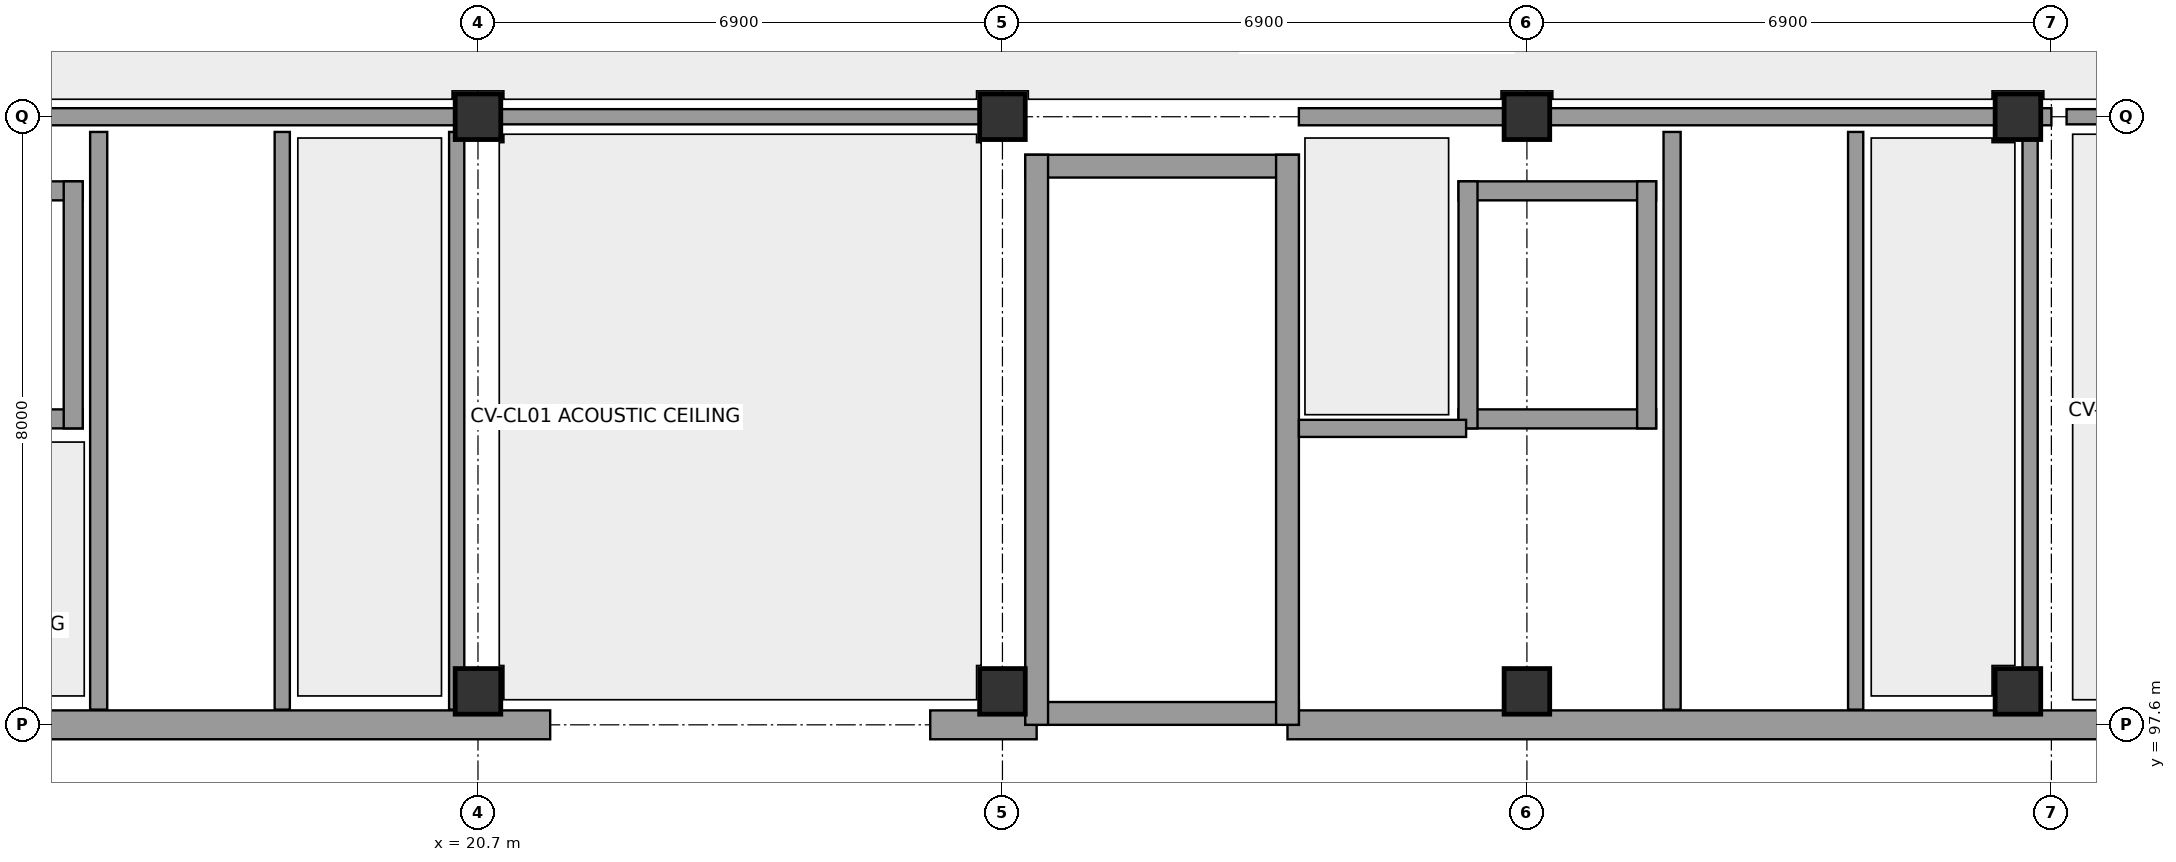
"""IFC4 building model, lengths in metres.
Left out: names, types, materials, properties, quantities, classifications, styles, units other than length and angle.
Written with IfcOpenShell. Run it as: python <this file> out.ifc"""

import sys

from ifc_helpers import new_model, si_unit, direction, frame, frame_2d, origin, origin_with_axes, origin_2d, place, context, subcontext, project, spatial, rectangle, extrude, element, fill, save


model = new_model("IFC4")
c1 = context("Model", 3, precision=1e-05, world=origin(), true_north=direction((0.0, 1.0)))
c2 = subcontext(c1, "Body", "Model", "MODEL_VIEW")
j1 = project(units=[si_unit("LENGTHUNIT", "METRE"), si_unit("PLANEANGLEUNIT", "RADIAN")], contexts=[c1])
p1 = place(None, origin())
s1 = spatial("IfcSite", under=j1, at=p1, CompositionType="ELEMENT")
p2 = place(p1, origin())
s2 = spatial("IfcBuilding", under=s1, at=p2, CompositionType="ELEMENT")
p3 = place(p2, origin())
s3 = spatial("IfcBuildingStorey", under=s2, at=p3, CompositionType="ELEMENT", Elevation=0.0)
for number, where, z_axis, x_axis in (
    (1, (20.7, 98.04, 0.0), (0.0, 0.0, 1.0), (1.0, 0.0, 0.0)),
    (2, (20.7, 105.6, 0.0), (0.0, 0.0, 1.0), (1.0, 0.0, 0.0)),
    (3, (27.6, 98.04, 0.0), (0.0, 0.0, 1.0), (1.0, 0.0, 0.0)),
    (4, (27.6, 105.6, 0.0), (0.0, 0.0, 1.0), (1.0, 0.0, 0.0)),
    (5, (34.5, 98.04, 0.0), (0.0, 0.0, 1.0), (1.0, 0.0, 0.0)),
    (6, (34.5, 105.6, 0.0), (0.0, 0.0, 1.0), (1.0, 0.0, 0.0)),
    (7, (40.96, 98.04, 0.0), (0.0, 0.0, 1.0), (1.0, 0.0, 0.0)),
    (8, (40.96, 105.6, 0.0), (0.0, 0.0, 1.0), (1.0, 0.0, 0.0)),
):
    element("IfcColumn", number, at=place(p3, frame(where, z_axis=z_axis, x_axis=x_axis)), inside=s3, PredefinedType="COLUMN", context=c2, shape_type="SweptSolid", body=[
        extrude(rectangle(XDim=0.6, YDim=0.6, at=origin_2d()), origin(), (0.0, 0.0, 1.0), 4.4),
    ])
p4 = place(p3, frame((10.65, 97.6, 0.0), z_axis=(0.0, 0.0, 1.0), x_axis=(1.0, 0.0, 0.0)))
e9 = element("IfcWall", 9, at=p4, inside=s3, PredefinedType="STANDARD", context=c2, shape_type="SweptSolid", body=[
    extrude(rectangle(XDim=11.0, YDim=0.38, at=frame_2d((5.5, 0.0))), origin(), (0.0, 0.0, 1.0), 4.12),
])
p5 = place(p3, frame((26.65, 97.6, 0.0), z_axis=(0.0, 0.0, 1.0), x_axis=(1.0, 0.0, 0.0)))
e10 = element("IfcWall", 10, at=p5, inside=s3, PredefinedType="STANDARD", context=c2, shape_type="SweptSolid", body=[
    extrude(rectangle(XDim=1.4, YDim=0.38, at=frame_2d((0.7, 0.0))), origin(), (0.0, 0.0, 1.0), 4.12),
])
p6 = place(p3, frame((31.35, 97.6, 0.0), z_axis=(0.0, 0.0, 1.0), x_axis=(1.0, 0.0, 0.0)))
e11 = element("IfcWall", 11, at=p6, inside=s3, PredefinedType="STANDARD", context=c2, shape_type="SweptSolid", body=[
    extrude(rectangle(XDim=11.0, YDim=0.38, at=frame_2d((5.5, 0.0))), origin(), (0.0, 0.0, 1.0), 4.12),
])
p7 = place(p3, frame((12.9, 101.625, 0.0), z_axis=(0.0, 0.0, 1.0), x_axis=(1.0, 0.0, 0.0)))
e12 = element("IfcWall", 12, at=p7, inside=s3, PredefinedType="SHEAR", context=c2, shape_type="SweptSolid", body=[
    extrude(rectangle(XDim=2.6, YDim=0.25, at=frame_2d((1.3, 0.0))), origin(), (0.0, 0.0, 1.0), 4.12),
])
p8 = place(p7, frame((0.875, 0.0, 0.0)))
e13 = element("IfcOpeningElement", 13, at=p8, cuts=e12, PredefinedType="OPENING", context=c2, shape_type="SweptSolid", body=[
    extrude(rectangle(XDim=1.1, YDim=2.1, at=frame_2d((0.55, 1.05))), frame((0.0, 0.137, 0.0), z_axis=(0.0, -1.0, 0.0), x_axis=(1.0, 0.0, 0.0)), (0.0, 0.0, 1.0), 0.274),
])
p9 = place(p3, frame((12.9, 104.625, 0.0), z_axis=(0.0, 0.0, 1.0), x_axis=(1.0, 0.0, 0.0)))
e14 = element("IfcWall", 14, at=p9, inside=s3, PredefinedType="SHEAR", context=c2, shape_type="SweptSolid", body=[
    extrude(rectangle(XDim=2.6, YDim=0.25, at=frame_2d((1.3, 0.0))), origin(), (0.0, 0.0, 1.0), 4.12),
])
p10 = place(p3, frame((15.375, 101.5, 0.0), z_axis=(0.0, 0.0, 1.0), x_axis=(0.0, 1.0, 0.0)))
e15 = element("IfcWall", 15, at=p10, inside=s3, PredefinedType="SHEAR", context=c2, shape_type="SweptSolid", body=[
    extrude(rectangle(XDim=3.25, YDim=0.25, at=frame_2d((1.625, 0.0))), origin(), (0.0, 0.0, 1.0), 4.12),
])
p11 = place(p3, frame((15.71, 97.8, 0.0), z_axis=(0.0, 0.0, 1.0), x_axis=(0.0, 1.0, 0.0)))
e16 = element("IfcWall", 16, at=p11, inside=s3, PredefinedType="PARTITIONING", context=c2, shape_type="SweptSolid", body=[
    extrude(rectangle(XDim=7.6, YDim=0.225, at=frame_2d((3.8, 0.0))), origin(), (0.0, 0.0, 1.0), 3.79),
])
p12 = place(p3, frame((18.125, 97.8, 0.0), z_axis=(0.0, 0.0, 1.0), x_axis=(0.0, 1.0, 0.0)))
e17 = element("IfcWall", 17, at=p12, inside=s3, PredefinedType="PARTITIONING", context=c2, shape_type="SweptSolid", body=[
    extrude(rectangle(XDim=7.6, YDim=0.2, at=frame_2d((3.8, 0.0))), origin(), (0.0, 0.0, 1.0), 3.79),
])
p13 = place(p3, frame((20.42, 97.8, 0.0), z_axis=(0.0, 0.0, 1.0), x_axis=(0.0, 1.0, 0.0)))
e18 = element("IfcWall", 18, at=p13, inside=s3, PredefinedType="PARTITIONING", context=c2, shape_type="SweptSolid", body=[
    extrude(rectangle(XDim=7.6, YDim=0.2, at=frame_2d((3.8, 0.0))), origin(), (0.0, 0.0, 1.0), 4.12),
])
p14 = place(p3, frame((10.8, 105.6, 0.0), z_axis=(0.0, 0.0, 1.0), x_axis=(1.0, 0.0, 0.0)))
e19 = element("IfcWall", 19, at=p14, inside=s3, PredefinedType="PARTITIONING", context=c2, shape_type="SweptSolid", body=[
    extrude(rectangle(XDim=9.9, YDim=0.225, at=frame_2d((4.95, 0.0))), origin(), (0.0, 0.0, 1.0), 3.56),
])
p15 = place(p14, frame((0.475, 0.0, 0.0)))
e20 = element("IfcOpeningElement", 20, at=p15, cuts=e19, PredefinedType="OPENING", context=c2, shape_type="SweptSolid", body=[
    extrude(rectangle(XDim=1.1, YDim=2.15, at=frame_2d((0.55, 1.075))), frame((0.0, 0.125, 0.0), z_axis=(0.0, -1.0, 0.0), x_axis=(1.0, 0.0, 0.0)), (0.0, 0.0, 1.0), 0.249),
])
p16 = place(p14, frame((5.75, 0.0, 0.0)))
e21 = element("IfcOpeningElement", 21, at=p16, cuts=e19, PredefinedType="OPENING", context=c2, shape_type="SweptSolid", body=[
    extrude(rectangle(XDim=0.9, YDim=2.1, at=frame_2d((0.45, 1.05))), frame((0.0, 0.125, 0.0), z_axis=(0.0, -1.0, 0.0), x_axis=(1.0, 0.0, 0.0)), (0.0, 0.0, 1.0), 0.249),
])
p17 = place(p14, frame((7.8, 0.0, 0.0)))
e22 = element("IfcOpeningElement", 22, at=p17, cuts=e19, PredefinedType="OPENING", context=c2, shape_type="SweptSolid", body=[
    extrude(rectangle(XDim=0.95, YDim=2.15, at=frame_2d((0.475, 1.075))), frame((0.0, 0.125, 0.0), z_axis=(0.0, -1.0, 0.0), x_axis=(1.0, 0.0, 0.0)), (0.0, 0.0, 1.0), 0.249),
])
p18 = place(p3, frame((27.9, 97.75, 0.0), z_axis=(0.0, 0.0, 1.0), x_axis=(1.0, 0.0, 0.0)))
e23 = element("IfcWall", 23, at=p18, inside=s3, PredefinedType="SHEAR", context=c2, shape_type="SweptSolid", body=[
    extrude(rectangle(XDim=3.6, YDim=0.3, at=frame_2d((1.8, 0.0))), origin(), (0.0, 0.0, 1.0), 4.12),
])
p19 = place(p18, frame((1.1, 0.0, 0.0)))
e24 = element("IfcOpeningElement", 24, at=p19, cuts=e23, PredefinedType="OPENING", context=c2, shape_type="SweptSolid", body=[
    extrude(rectangle(XDim=1.4, YDim=2.25, at=frame_2d((0.7, 1.125))), frame((0.0, 0.162, 0.0), z_axis=(0.0, -1.0, 0.0), x_axis=(1.0, 0.0, 0.0)), (0.0, 0.0, 1.0), 0.324),
])
p20 = place(p3, frame((27.9, 104.95, 0.0), z_axis=(0.0, 0.0, 1.0), x_axis=(1.0, 0.0, 0.0)))
e25 = element("IfcWall", 25, at=p20, inside=s3, PredefinedType="SHEAR", context=c2, shape_type="SweptSolid", body=[
    extrude(rectangle(XDim=3.6, YDim=0.3, at=frame_2d((1.8, 0.0))), origin(), (0.0, 0.0, 1.0), 4.12),
])
p21 = place(p3, frame((28.05, 97.6, 0.0), z_axis=(0.0, 0.0, 1.0), x_axis=(0.0, 1.0, 0.0)))
e26 = element("IfcWall", 26, at=p21, inside=s3, PredefinedType="SHEAR", context=c2, shape_type="SweptSolid", body=[
    extrude(rectangle(XDim=7.5, YDim=0.3, at=frame_2d((3.75, 0.0))), origin(), (0.0, 0.0, 1.0), 4.12),
])
p22 = place(p3, frame((31.35, 97.6, 0.0), z_axis=(0.0, 0.0, 1.0), x_axis=(0.0, 1.0, 0.0)))
e27 = element("IfcWall", 27, at=p22, inside=s3, PredefinedType="SHEAR", context=c2, shape_type="SweptSolid", body=[
    extrude(rectangle(XDim=7.5, YDim=0.3, at=frame_2d((3.75, 0.0))), origin(), (0.0, 0.0, 1.0), 4.12),
])
p23 = place(p22, frame((0.65, 0.0, 0.0)))
e28 = element("IfcOpeningElement", 28, at=p23, cuts=e27, PredefinedType="OPENING", context=c2, shape_type="SweptSolid", body=[
    extrude(rectangle(XDim=1.15, YDim=2.15, at=frame_2d((0.575, 1.075))), frame((0.0, 0.162, 0.0), z_axis=(0.0, -1.0, 0.0), x_axis=(1.0, 0.0, 0.0)), (0.0, 0.0, 1.0), 0.324),
])
p24 = place(p3, frame((33.6, 101.625, 0.0), z_axis=(0.0, 0.0, 1.0), x_axis=(1.0, 0.0, 0.0)))
e29 = element("IfcWall", 29, at=p24, inside=s3, PredefinedType="SHEAR", context=c2, shape_type="SweptSolid", body=[
    extrude(rectangle(XDim=2.6, YDim=0.25, at=frame_2d((1.3, 0.0))), origin(), (0.0, 0.0, 1.0), 4.12),
])
p25 = place(p24, frame((0.925, 0.0, 0.0)))
e30 = element("IfcOpeningElement", 30, at=p25, cuts=e29, PredefinedType="OPENING", context=c2, shape_type="SweptSolid", body=[
    extrude(rectangle(XDim=1.0, YDim=2.1, at=frame_2d((0.5, 1.05))), frame((0.0, 0.137, 0.0), z_axis=(0.0, -1.0, 0.0), x_axis=(1.0, 0.0, 0.0)), (0.0, 0.0, 1.0), 0.274),
])
p26 = place(p3, frame((33.6, 104.625, 0.0), z_axis=(0.0, 0.0, 1.0), x_axis=(1.0, 0.0, 0.0)))
e31 = element("IfcWall", 31, at=p26, inside=s3, PredefinedType="SHEAR", context=c2, shape_type="SweptSolid", body=[
    extrude(rectangle(XDim=2.6, YDim=0.25, at=frame_2d((1.3, 0.0))), origin(), (0.0, 0.0, 1.0), 4.12),
])
for number, where, z_axis, x_axis in (
    (32, (33.725, 101.5, 0.0), (0.0, 0.0, 1.0), (0.0, 1.0, 0.0)),
    (33, (36.075, 101.5, 0.0), (0.0, 0.0, 1.0), (0.0, 1.0, 0.0)),
):
    element("IfcWall", number, at=place(p3, frame(where, z_axis=z_axis, x_axis=x_axis)), inside=s3, PredefinedType="SHEAR", context=c2, shape_type="SweptSolid", body=[
        extrude(rectangle(XDim=3.25, YDim=0.25, at=frame_2d((1.625, 0.0))), origin(), (0.0, 0.0, 1.0), 4.12),
    ])
p27 = place(p3, frame((36.41, 97.8, 0.0), z_axis=(0.0, 0.0, 1.0), x_axis=(0.0, 1.0, 0.0)))
e34 = element("IfcWall", 34, at=p27, inside=s3, PredefinedType="PARTITIONING", context=c2, shape_type="SweptSolid", body=[
    extrude(rectangle(XDim=7.6, YDim=0.225, at=frame_2d((3.8, 0.0))), origin(), (0.0, 0.0, 1.0), 4.12),
])
p28 = place(p3, frame((31.5, 101.5, 0.0), z_axis=(0.0, 0.0, 1.0), x_axis=(1.0, 0.0, 0.0)))
e35 = element("IfcWall", 35, at=p28, inside=s3, PredefinedType="PARTITIONING", context=c2, shape_type="SweptSolid", body=[
    extrude(rectangle(XDim=2.2, YDim=0.225, at=frame_2d((1.1, 0.0))), origin(), (0.0, 0.0, 1.0), 4.12),
])
p29 = place(p28, frame((0.45, 0.0, 0.0)))
e36 = element("IfcOpeningElement", 36, at=p29, cuts=e35, PredefinedType="OPENING", context=c2, shape_type="SweptSolid", body=[
    extrude(rectangle(XDim=1.1, YDim=2.15, at=frame_2d((0.55, 1.075))), frame((0.0, 0.125, 0.0), z_axis=(0.0, -1.0, 0.0), x_axis=(1.0, 0.0, 0.0)), (0.0, 0.0, 1.0), 0.249),
])
p30 = place(p3, frame((27.6, 105.6, 0.0), z_axis=(0.0, 0.0, 1.0), x_axis=(1.0, 0.0, 0.0)))
e37 = element("IfcWall", 37, at=p30, inside=s3, PredefinedType="PARTITIONING", context=c2, shape_type="SweptSolid", body=[
    extrude(rectangle(XDim=0.3, YDim=0.225, at=frame_2d((0.15, 0.0))), origin(), (0.0, 0.0, 1.0), 4.12),
])
for number, where, z_axis, x_axis in (
    (38, (38.825, 97.8, 0.0), (0.0, 0.0, 1.0), (0.0, 1.0, 0.0)),
    (39, (41.12, 97.8, 0.0), (0.0, 0.0, 1.0), (0.0, 1.0, 0.0)),
):
    element("IfcWall", number, at=place(p3, frame(where, z_axis=z_axis, x_axis=x_axis)), inside=s3, PredefinedType="PARTITIONING", context=c2, shape_type="SweptSolid", body=[
        extrude(rectangle(XDim=7.6, YDim=0.2, at=frame_2d((3.8, 0.0))), origin(), (0.0, 0.0, 1.0), 4.12),
    ])
p31 = place(p3, frame((31.5, 105.6, 0.0), z_axis=(0.0, 0.0, 1.0), x_axis=(1.0, 0.0, 0.0)))
e40 = element("IfcWall", 40, at=p31, inside=s3, PredefinedType="PARTITIONING", context=c2, shape_type="SweptSolid", body=[
    extrude(rectangle(XDim=9.9, YDim=0.225, at=frame_2d((4.95, 0.0))), origin(), (0.0, 0.0, 1.0), 3.56),
])
p32 = place(p31, frame((0.475, 0.0, 0.0)))
e41 = element("IfcOpeningElement", 41, at=p32, cuts=e40, PredefinedType="OPENING", context=c2, shape_type="SweptSolid", body=[
    extrude(rectangle(XDim=1.1, YDim=2.15, at=frame_2d((0.55, 1.075))), frame((0.0, 0.125, 0.0), z_axis=(0.0, -1.0, 0.0), x_axis=(1.0, 0.0, 0.0)), (0.0, 0.0, 1.0), 0.249),
])
p33 = place(p31, frame((5.75, 0.0, 0.0)))
e42 = element("IfcOpeningElement", 42, at=p33, cuts=e40, PredefinedType="OPENING", context=c2, shape_type="SweptSolid", body=[
    extrude(rectangle(XDim=0.9, YDim=2.1, at=frame_2d((0.45, 1.05))), frame((0.0, 0.125, 0.0), z_axis=(0.0, -1.0, 0.0), x_axis=(1.0, 0.0, 0.0)), (0.0, 0.0, 1.0), 0.249),
])
p34 = place(p31, frame((7.8, 0.0, 0.0)))
e43 = element("IfcOpeningElement", 43, at=p34, cuts=e40, PredefinedType="OPENING", context=c2, shape_type="SweptSolid", body=[
    extrude(rectangle(XDim=0.95, YDim=2.15, at=frame_2d((0.475, 1.075))), frame((0.0, 0.125, 0.0), z_axis=(0.0, -1.0, 0.0), x_axis=(1.0, 0.0, 0.0)), (0.0, 0.0, 1.0), 0.249),
])
p35 = place(p3, frame((20.9, 105.6, 0.0), z_axis=(0.0, 0.0, 1.0), x_axis=(1.0, 0.0, 0.0)))
e44 = element("IfcWall", 44, at=p35, inside=s3, PredefinedType="PARTITIONING", context=c2, shape_type="SweptSolid", body=[
    extrude(rectangle(XDim=6.5, YDim=0.2, at=frame_2d((3.25, 0.0))), origin(), (0.0, 0.0, 1.0), 3.56),
])
p36 = place(p35, frame((1.9, 0.0, 0.0)))
e45 = element("IfcOpeningElement", 45, at=p36, cuts=e44, PredefinedType="OPENING", context=c2, shape_type="SweptSolid", body=[
    extrude(rectangle(XDim=0.95, YDim=2.15, at=frame_2d((0.475, 1.075))), frame((0.0, 0.112, 0.0), z_axis=(0.0, -1.0, 0.0), x_axis=(1.0, 0.0, 0.0)), (0.0, 0.0, 1.0), 0.224),
])
p37 = place(p3, frame((41.6, 105.6, 0.0), z_axis=(0.0, 0.0, 1.0), x_axis=(1.0, 0.0, 0.0)))
e46 = element("IfcWall", 46, at=p37, inside=s3, PredefinedType="PARTITIONING", context=c2, shape_type="SweptSolid", body=[
    extrude(rectangle(XDim=13.35, YDim=0.2, at=frame_2d((6.675, 0.0))), origin(), (0.0, 0.0, 1.0), 3.56),
])
p38 = place(p37, frame((1.9, 0.0, 0.0)))
e47 = element("IfcOpeningElement", 47, at=p38, cuts=e46, PredefinedType="OPENING", context=c2, shape_type="SweptSolid", body=[
    extrude(rectangle(XDim=0.95, YDim=2.15, at=frame_2d((0.475, 1.075))), frame((0.0, 0.112, 0.0), z_axis=(0.0, -1.0, 0.0), x_axis=(1.0, 0.0, 0.0)), (0.0, 0.0, 1.0), 0.224),
])
p39 = place(p16, origin_with_axes())
e48 = element("IfcDoor", 48, at=p39, inside=s3, OperationType="SINGLE_SWING_LEFT", PredefinedType="DOOR", context=c2, shape_type="SweptSolid", body=[
    extrude(rectangle(XDim=0.9, YDim=2.1, at=frame_2d((0.45, 1.05))), frame((0.0, 0.025, 0.0), z_axis=(0.0, -1.0, 0.0), x_axis=(1.0, 0.0, 0.0)), (0.0, 0.0, 1.0), 0.05),
])
fill(e21, e48)
p40 = place(p17, origin_with_axes())
e49 = element("IfcDoor", 49, at=p40, inside=s3, OperationType="SINGLE_SWING_RIGHT", PredefinedType="DOOR", context=c2, shape_type="SweptSolid", body=[
    extrude(rectangle(XDim=0.95, YDim=2.15, at=frame_2d((0.475, 1.075))), frame((0.0, 0.025, 0.0), z_axis=(0.0, -1.0, 0.0), x_axis=(1.0, 0.0, 0.0)), (0.0, 0.0, 1.0), 0.05),
])
fill(e22, e49)
p41 = place(p19, frame((1.4, 0.0, 0.0), z_axis=(0.0, 0.0, 1.0), x_axis=(-1.0, 0.0, 0.0)))
e50 = element("IfcDoor", 50, at=p41, inside=s3, OperationType="DOUBLE_DOOR_SINGLE_SWING", PredefinedType="DOOR", context=c2, shape_type="SweptSolid", body=[
    extrude(rectangle(XDim=1.4, YDim=2.25, at=frame_2d((0.7, 1.125))), frame((0.0, 0.025, 0.0), z_axis=(0.0, -1.0, 0.0), x_axis=(1.0, 0.0, 0.0)), (0.0, 0.0, 1.0), 0.05),
])
fill(e24, e50)
p42 = place(p23, origin_with_axes())
e51 = element("IfcDoor", 51, at=p42, inside=s3, OperationType="SINGLE_SWING_RIGHT", PredefinedType="DOOR", context=c2, shape_type="SweptSolid", body=[
    extrude(rectangle(XDim=1.15, YDim=2.15, at=frame_2d((0.575, 1.075))), frame((0.0, 0.025, 0.0), z_axis=(0.0, -1.0, 0.0), x_axis=(1.0, 0.0, 0.0)), (0.0, 0.0, 1.0), 0.05),
])
fill(e28, e51)
p43 = place(p25, origin_with_axes())
e52 = element("IfcDoor", 52, at=p43, inside=s3, OperationType="SLIDING_TO_LEFT", PredefinedType="DOOR", context=c2, shape_type="SweptSolid", body=[
    extrude(rectangle(XDim=1.0, YDim=2.1, at=frame_2d((0.5, 1.05))), frame((0.0, 0.025, 0.0), z_axis=(0.0, -1.0, 0.0), x_axis=(1.0, 0.0, 0.0)), (0.0, 0.0, 1.0), 0.05),
])
fill(e30, e52)
p44 = place(p29, frame((1.1, 0.0, 0.0), z_axis=(0.0, 0.0, 1.0), x_axis=(-1.0, 0.0, 0.0)))
e53 = element("IfcDoor", 53, at=p44, inside=s3, OperationType="SINGLE_SWING_LEFT", PredefinedType="DOOR", context=c2, shape_type="SweptSolid", body=[
    extrude(rectangle(XDim=1.1, YDim=2.15, at=frame_2d((0.55, 1.075))), frame((0.0, 0.025, 0.0), z_axis=(0.0, -1.0, 0.0), x_axis=(1.0, 0.0, 0.0)), (0.0, 0.0, 1.0), 0.05),
])
fill(e36, e53)
p45 = place(p32, frame((1.1, 0.0, 0.0), z_axis=(0.0, 0.0, 1.0), x_axis=(-1.0, 0.0, 0.0)))
e54 = element("IfcDoor", 54, at=p45, inside=s3, OperationType="SINGLE_SWING_RIGHT", PredefinedType="DOOR", context=c2, shape_type="SweptSolid", body=[
    extrude(rectangle(XDim=1.1, YDim=2.15, at=frame_2d((0.55, 1.075))), frame((0.0, 0.025, 0.0), z_axis=(0.0, -1.0, 0.0), x_axis=(1.0, 0.0, 0.0)), (0.0, 0.0, 1.0), 0.05),
])
fill(e41, e54)
p46 = place(p33, origin_with_axes())
e55 = element("IfcDoor", 55, at=p46, inside=s3, OperationType="SINGLE_SWING_LEFT", PredefinedType="DOOR", context=c2, shape_type="SweptSolid", body=[
    extrude(rectangle(XDim=0.9, YDim=2.1, at=frame_2d((0.45, 1.05))), frame((0.0, 0.025, 0.0), z_axis=(0.0, -1.0, 0.0), x_axis=(1.0, 0.0, 0.0)), (0.0, 0.0, 1.0), 0.05),
])
fill(e42, e55)
p47 = place(p34, origin_with_axes())
e56 = element("IfcDoor", 56, at=p47, inside=s3, OperationType="SINGLE_SWING_RIGHT", PredefinedType="DOOR", context=c2, shape_type="SweptSolid", body=[
    extrude(rectangle(XDim=0.95, YDim=2.15, at=frame_2d((0.475, 1.075))), frame((0.0, 0.025, 0.0), z_axis=(0.0, -1.0, 0.0), x_axis=(1.0, 0.0, 0.0)), (0.0, 0.0, 1.0), 0.05),
])
fill(e43, e56)
p48 = place(p36, frame((0.95, 0.0, 0.0), z_axis=(0.0, 0.0, 1.0), x_axis=(-1.0, 0.0, 0.0)))
e57 = element("IfcDoor", 57, at=p48, inside=s3, OperationType="SINGLE_SWING_LEFT", PredefinedType="DOOR", context=c2, shape_type="SweptSolid", body=[
    extrude(rectangle(XDim=0.95, YDim=2.15, at=frame_2d((0.475, 1.075))), frame((0.0, 0.025, 0.0), z_axis=(0.0, -1.0, 0.0), x_axis=(1.0, 0.0, 0.0)), (0.0, 0.0, 1.0), 0.05),
])
fill(e45, e57)
save(model, sys.argv[1])
